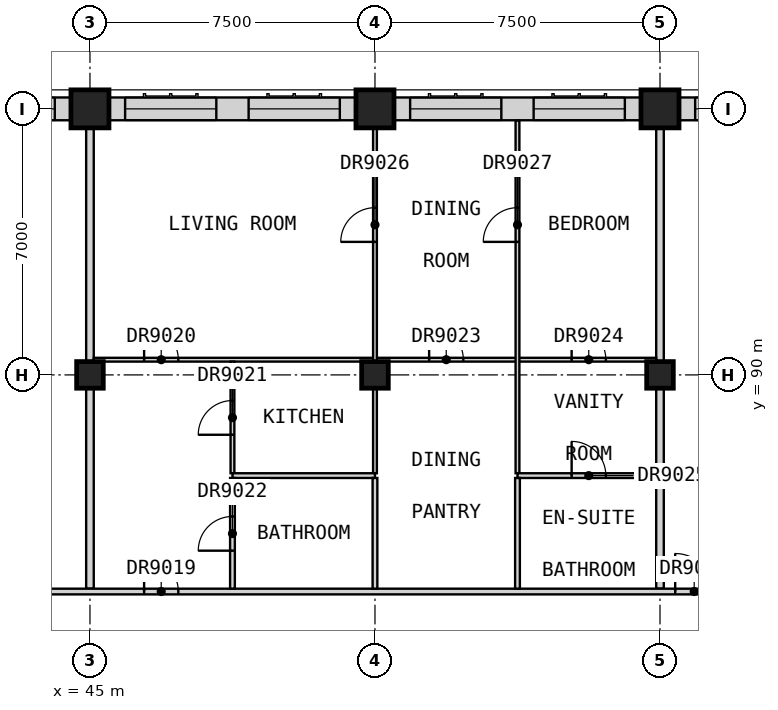
"""IFC4 building model, lengths in metres.
Left out: names, types, materials, properties, quantities, classifications, styles, units other than length and angle.
Written with IfcOpenShell. Run it as: python <this file> out.ifc"""

import sys

from ifc_helpers import new_model, si_unit, direction, frame, frame_2d, origin, origin_2d, place, context, subcontext, project, spatial, rectangle, extrude, element, fill, save


model = new_model("IFC4")
c1 = context("Model", 3, precision=1e-05, world=origin(), true_north=direction((0.0, 1.0)))
c2 = subcontext(c1, "Body", "Model", "MODEL_VIEW")
j1 = project(units=[si_unit("LENGTHUNIT", "METRE"), si_unit("PLANEANGLEUNIT", "RADIAN")], contexts=[c1])
p1 = place(None, origin())
s1 = spatial("IfcSite", under=j1, at=p1, CompositionType="ELEMENT")
p2 = place(p1, origin())
s2 = spatial("IfcBuilding", under=s1, at=p2, CompositionType="ELEMENT")
p3 = place(p2, frame((0.0, 0.0, 280.2)))
s3 = spatial("IfcBuildingStorey", under=s2, at=p3, CompositionType="ELEMENT", Elevation=280.2)
p4 = place(p3, frame((45.0, 90.0, 0.0), z_axis=(0.0, 0.0, 1.0), x_axis=(1.0, 0.0, 0.0)))
e1 = element("IfcColumn", 1, at=p4, inside=s3, PredefinedType="COLUMN", context=c2, shape_type="SweptSolid", body=[
    extrude(rectangle(XDim=0.7, YDim=0.7, at=origin_2d()), origin(), (0.0, 0.0, 1.0), 3.5),
])
p5 = place(p3, frame((45.0, 97.0, 0.0), z_axis=(0.0, 0.0, 1.0), x_axis=(1.0, 0.0, 0.0)))
e2 = element("IfcColumn", 2, at=p5, inside=s3, PredefinedType="COLUMN", context=c2, shape_type="SweptSolid", body=[
    extrude(rectangle(XDim=1.0, YDim=1.0, at=origin_2d()), origin(), (0.0, 0.0, 1.0), 3.5),
])
p6 = place(p3, frame((52.5, 90.0, 0.0), z_axis=(0.0, 0.0, 1.0), x_axis=(1.0, 0.0, 0.0)))
e3 = element("IfcColumn", 3, at=p6, inside=s3, PredefinedType="COLUMN", context=c2, shape_type="SweptSolid", body=[
    extrude(rectangle(XDim=0.7, YDim=0.7, at=origin_2d()), origin(), (0.0, 0.0, 1.0), 3.5),
])
p7 = place(p3, frame((52.5, 97.0, 0.0), z_axis=(0.0, 0.0, 1.0), x_axis=(1.0, 0.0, 0.0)))
e4 = element("IfcColumn", 4, at=p7, inside=s3, PredefinedType="COLUMN", context=c2, shape_type="SweptSolid", body=[
    extrude(rectangle(XDim=1.0, YDim=1.0, at=origin_2d()), origin(), (0.0, 0.0, 1.0), 3.5),
])
p8 = place(p3, frame((60.0, 90.0, 0.0), z_axis=(0.0, 0.0, 1.0), x_axis=(1.0, 0.0, 0.0)))
e5 = element("IfcColumn", 5, at=p8, inside=s3, PredefinedType="COLUMN", context=c2, shape_type="SweptSolid", body=[
    extrude(rectangle(XDim=0.7, YDim=0.7, at=origin_2d()), origin(), (0.0, 0.0, 1.0), 3.5),
])
p9 = place(p3, frame((60.0, 97.0, 0.0), z_axis=(0.0, 0.0, 1.0), x_axis=(1.0, 0.0, 0.0)))
e6 = element("IfcColumn", 6, at=p9, inside=s3, PredefinedType="COLUMN", context=c2, shape_type="SweptSolid", body=[
    extrude(rectangle(XDim=1.0, YDim=1.0, at=origin_2d()), origin(), (0.0, 0.0, 1.0), 3.5),
])
p10 = place(p3, frame((67.0, 97.0, 0.0), z_axis=(0.0, 0.0, 1.0), x_axis=(-1.0, 0.0, 0.0)))
e7 = element("IfcWall", 7, at=p10, inside=s3, PredefinedType="SOLIDWALL", context=c2, shape_type="SweptSolid", body=[
    extrude(rectangle(XDim=6.5, YDim=0.6, at=frame_2d((3.25, 0.0))), origin(), (0.0, 0.0, 1.0), 2.75),
])
p11 = place(p10, frame((3.675, 0.0, 0.8)))
e8 = element("IfcOpeningElement", 8, at=p11, cuts=e7, PredefinedType="OPENING", context=c2, shape_type="SweptSolid", body=[
    extrude(rectangle(XDim=2.4, YDim=1.8, at=frame_2d((1.2, 0.9))), frame((0.0, 0.31, 0.0), z_axis=(0.0, -1.0, 0.0), x_axis=(1.0, 0.0, 0.0)), (0.0, 0.0, 1.0), 0.62),
])
p12 = place(p10, frame((0.425, 0.0, 0.8)))
e9 = element("IfcOpeningElement", 9, at=p12, cuts=e7, PredefinedType="OPENING", context=c2, shape_type="SweptSolid", body=[
    extrude(rectangle(XDim=2.4, YDim=1.8, at=frame_2d((1.2, 0.9))), frame((0.0, 0.31, 0.0), z_axis=(0.0, -1.0, 0.0), x_axis=(1.0, 0.0, 0.0)), (0.0, 0.0, 1.0), 0.62),
])
p13 = place(p3, frame((59.5, 97.0, 0.0), z_axis=(0.0, 0.0, 1.0), x_axis=(-1.0, 0.0, 0.0)))
e10 = element("IfcWall", 10, at=p13, inside=s3, PredefinedType="SOLIDWALL", context=c2, shape_type="SweptSolid", body=[
    extrude(rectangle(XDim=6.5, YDim=0.6, at=frame_2d((3.25, 0.0))), origin(), (0.0, 0.0, 1.0), 2.75),
])
p14 = place(p13, frame((3.675, 0.0, 0.8)))
e11 = element("IfcOpeningElement", 11, at=p14, cuts=e10, PredefinedType="OPENING", context=c2, shape_type="SweptSolid", body=[
    extrude(rectangle(XDim=2.4, YDim=1.8, at=frame_2d((1.2, 0.9))), frame((0.0, 0.31, 0.0), z_axis=(0.0, -1.0, 0.0), x_axis=(1.0, 0.0, 0.0)), (0.0, 0.0, 1.0), 0.62),
])
p15 = place(p13, frame((0.425, 0.0, 0.8)))
e12 = element("IfcOpeningElement", 12, at=p15, cuts=e10, PredefinedType="OPENING", context=c2, shape_type="SweptSolid", body=[
    extrude(rectangle(XDim=2.4, YDim=1.8, at=frame_2d((1.2, 0.9))), frame((0.0, 0.31, 0.0), z_axis=(0.0, -1.0, 0.0), x_axis=(1.0, 0.0, 0.0)), (0.0, 0.0, 1.0), 0.62),
])
p16 = place(p3, frame((52.0, 97.0, 0.0), z_axis=(0.0, 0.0, 1.0), x_axis=(-1.0, 0.0, 0.0)))
e13 = element("IfcWall", 13, at=p16, inside=s3, PredefinedType="SOLIDWALL", context=c2, shape_type="SweptSolid", body=[
    extrude(rectangle(XDim=6.5, YDim=0.6, at=frame_2d((3.25, 0.0))), origin(), (0.0, 0.0, 1.0), 2.75),
])
p17 = place(p16, frame((3.675, 0.0, 0.8)))
e14 = element("IfcOpeningElement", 14, at=p17, cuts=e13, PredefinedType="OPENING", context=c2, shape_type="SweptSolid", body=[
    extrude(rectangle(XDim=2.4, YDim=1.8, at=frame_2d((1.2, 0.9))), frame((0.0, 0.31, 0.0), z_axis=(0.0, -1.0, 0.0), x_axis=(1.0, 0.0, 0.0)), (0.0, 0.0, 1.0), 0.62),
])
p18 = place(p16, frame((0.425, 0.0, 0.8)))
e15 = element("IfcOpeningElement", 15, at=p18, cuts=e13, PredefinedType="OPENING", context=c2, shape_type="SweptSolid", body=[
    extrude(rectangle(XDim=2.4, YDim=1.8, at=frame_2d((1.2, 0.9))), frame((0.0, 0.31, 0.0), z_axis=(0.0, -1.0, 0.0), x_axis=(1.0, 0.0, 0.0)), (0.0, 0.0, 1.0), 0.62),
])
p19 = place(p3, frame((44.5, 97.0, 0.0), z_axis=(0.0, 0.0, 1.0), x_axis=(-1.0, 0.0, 0.0)))
e16 = element("IfcWall", 16, at=p19, inside=s3, PredefinedType="SOLIDWALL", context=c2, shape_type="SweptSolid", body=[
    extrude(rectangle(XDim=6.5, YDim=0.6, at=frame_2d((3.25, 0.0))), origin(), (0.0, 0.0, 1.0), 2.75),
])
p20 = place(p19, frame((3.675, 0.0, 0.8)))
e17 = element("IfcOpeningElement", 17, at=p20, cuts=e16, PredefinedType="OPENING", context=c2, shape_type="SweptSolid", body=[
    extrude(rectangle(XDim=2.4, YDim=1.8, at=frame_2d((1.2, 0.9))), frame((0.0, 0.31, 0.0), z_axis=(0.0, -1.0, 0.0), x_axis=(1.0, 0.0, 0.0)), (0.0, 0.0, 1.0), 0.62),
])
p21 = place(p19, frame((0.425, 0.0, 0.8)))
e18 = element("IfcOpeningElement", 18, at=p21, cuts=e16, PredefinedType="OPENING", context=c2, shape_type="SweptSolid", body=[
    extrude(rectangle(XDim=2.4, YDim=1.8, at=frame_2d((1.2, 0.9))), frame((0.0, 0.31, 0.0), z_axis=(0.0, -1.0, 0.0), x_axis=(1.0, 0.0, 0.0)), (0.0, 0.0, 1.0), 0.62),
])
for number, where, z_axis, x_axis in (
    (19, (45.0, 84.375, 0.0), (0.0, 0.0, 1.0), (0.0, 1.0, 0.0)),
    (20, (60.0, 84.375, 0.0), (0.0, 0.0, 1.0), (0.0, 1.0, 0.0)),
):
    element("IfcWall", number, at=place(p3, frame(where, z_axis=z_axis, x_axis=x_axis)), inside=s3, PredefinedType="PARTITIONING", context=c2, shape_type="SweptSolid", body=[
        extrude(rectangle(XDim=13.125, YDim=0.2, at=frame_2d((6.562, 0.0))), origin(), (0.0, 0.0, 1.0), 3.25),
    ])
p22 = place(p3, frame((33.75, 84.3, 0.0), z_axis=(0.0, 0.0, 1.0), x_axis=(1.0, 0.0, 0.0)))
e21 = element("IfcWall", 21, at=p22, inside=s3, PredefinedType="PARTITIONING", context=c2, shape_type="SweptSolid", body=[
    extrude(rectangle(XDim=28.05, YDim=0.15, at=frame_2d((14.025, 0.0))), origin(), (0.0, 0.0, 1.0), 3.25),
])
p23 = place(p22, frame((5.125, 0.0, 0.0)))
e22 = element("IfcOpeningElement", 22, at=p23, cuts=e21, PredefinedType="OPENING", context=c2, shape_type="SweptSolid", body=[
    extrude(rectangle(XDim=1.0, YDim=2.1, at=frame_2d((0.5, 1.05))), frame((0.0, 0.085, 0.0), z_axis=(0.0, -1.0, 0.0), x_axis=(1.0, 0.0, 0.0)), (0.0, 0.0, 1.0), 0.17),
])
p24 = place(p22, frame((12.675, 0.0, 0.0)))
e23 = element("IfcOpeningElement", 23, at=p24, cuts=e21, PredefinedType="OPENING", context=c2, shape_type="SweptSolid", body=[
    extrude(rectangle(XDim=0.9, YDim=2.1, at=frame_2d((0.45, 1.05))), frame((0.0, 0.085, 0.0), z_axis=(0.0, -1.0, 0.0), x_axis=(1.0, 0.0, 0.0)), (0.0, 0.0, 1.0), 0.17),
])
p25 = place(p22, frame((26.65, 0.0, 0.0)))
e24 = element("IfcOpeningElement", 24, at=p25, cuts=e21, PredefinedType="OPENING", context=c2, shape_type="SweptSolid", body=[
    extrude(rectangle(XDim=1.0, YDim=2.1, at=frame_2d((0.5, 1.05))), frame((0.0, 0.085, 0.0), z_axis=(0.0, -1.0, 0.0), x_axis=(1.0, 0.0, 0.0)), (0.0, 0.0, 1.0), 0.17),
])
p26 = place(p3, frame((45.1, 90.4, 0.0), z_axis=(0.0, 0.0, 1.0), x_axis=(1.0, 0.0, 0.0)))
e25 = element("IfcWall", 25, at=p26, inside=s3, PredefinedType="PARTITIONING", context=c2, shape_type="SweptSolid", body=[
    extrude(rectangle(XDim=14.8, YDim=0.1, at=frame_2d((7.4, 0.0))), origin(), (0.0, 0.0, 1.0), 3.25),
])
p27 = place(p26, frame((1.325, 0.0, 0.0)))
e26 = element("IfcOpeningElement", 26, at=p27, cuts=e25, PredefinedType="OPENING", context=c2, shape_type="SweptSolid", body=[
    extrude(rectangle(XDim=0.9, YDim=2.1, at=frame_2d((0.45, 1.05))), frame((0.0, 0.06, 0.0), z_axis=(0.0, -1.0, 0.0), x_axis=(1.0, 0.0, 0.0)), (0.0, 0.0, 1.0), 0.12),
])
p28 = place(p26, frame((8.825, 0.0, 0.0)))
e27 = element("IfcOpeningElement", 27, at=p28, cuts=e25, PredefinedType="OPENING", context=c2, shape_type="SweptSolid", body=[
    extrude(rectangle(XDim=0.9, YDim=2.1, at=frame_2d((0.45, 1.05))), frame((0.0, 0.06, 0.0), z_axis=(0.0, -1.0, 0.0), x_axis=(1.0, 0.0, 0.0)), (0.0, 0.0, 1.0), 0.12),
])
p29 = place(p26, frame((12.575, 0.0, 0.0)))
e28 = element("IfcOpeningElement", 28, at=p29, cuts=e25, PredefinedType="OPENING", context=c2, shape_type="SweptSolid", body=[
    extrude(rectangle(XDim=0.9, YDim=2.1, at=frame_2d((0.45, 1.05))), frame((0.0, 0.06, 0.0), z_axis=(0.0, -1.0, 0.0), x_axis=(1.0, 0.0, 0.0)), (0.0, 0.0, 1.0), 0.12),
])
p30 = place(p3, frame((48.75, 87.413, 0.0), z_axis=(0.0, 0.0, 1.0), x_axis=(0.0, 1.0, 0.0)))
e29 = element("IfcWall", 29, at=p30, inside=s3, PredefinedType="PARTITIONING", context=c2, shape_type="SweptSolid", body=[
    extrude(rectangle(XDim=2.938, YDim=0.1, at=frame_2d((1.469, 0.0))), origin(), (0.0, 0.0, 1.0), 3.25),
])
p31 = place(p30, frame((1.012, 0.0, 0.0)))
e30 = element("IfcOpeningElement", 30, at=p31, cuts=e29, PredefinedType="OPENING", context=c2, shape_type="SweptSolid", body=[
    extrude(rectangle(XDim=0.9, YDim=2.1, at=frame_2d((0.45, 1.05))), frame((0.0, 0.06, 0.0), z_axis=(0.0, -1.0, 0.0), x_axis=(1.0, 0.0, 0.0)), (0.0, 0.0, 1.0), 0.12),
])
p32 = place(p3, frame((52.5, 87.413, 0.0), z_axis=(0.0, 0.0, 1.0), x_axis=(0.0, 1.0, 0.0)))
e31 = element("IfcWall", 31, at=p32, inside=s3, PredefinedType="PARTITIONING", context=c2, shape_type="SweptSolid", body=[
    extrude(rectangle(XDim=10.087, YDim=0.1, at=frame_2d((5.044, 0.0))), origin(), (0.0, 0.0, 1.0), 3.25),
])
p33 = place(p32, frame((6.087, 0.0, 0.0)))
e32 = element("IfcOpeningElement", 32, at=p33, cuts=e31, PredefinedType="OPENING", context=c2, shape_type="SweptSolid", body=[
    extrude(rectangle(XDim=0.9, YDim=2.1, at=frame_2d((0.45, 1.05))), frame((0.0, 0.06, 0.0), z_axis=(0.0, -1.0, 0.0), x_axis=(1.0, 0.0, 0.0)), (0.0, 0.0, 1.0), 0.12),
])
p34 = place(p3, frame((56.25, 87.413, 0.0), z_axis=(0.0, 0.0, 1.0), x_axis=(0.0, 1.0, 0.0)))
e33 = element("IfcWall", 33, at=p34, inside=s3, PredefinedType="PARTITIONING", context=c2, shape_type="SweptSolid", body=[
    extrude(rectangle(XDim=9.277, YDim=0.1, at=frame_2d((4.639, 0.0))), origin(), (0.0, 0.0, 1.0), 3.25),
])
p35 = place(p34, frame((6.087, 0.0, 0.0)))
e34 = element("IfcOpeningElement", 34, at=p35, cuts=e33, PredefinedType="OPENING", context=c2, shape_type="SweptSolid", body=[
    extrude(rectangle(XDim=0.9, YDim=2.1, at=frame_2d((0.45, 1.05))), frame((0.0, 0.06, 0.0), z_axis=(0.0, -1.0, 0.0), x_axis=(1.0, 0.0, 0.0)), (0.0, 0.0, 1.0), 0.12),
])
p36 = place(p3, frame((48.75, 87.35, 0.0), z_axis=(0.0, 0.0, 1.0), x_axis=(1.0, 0.0, 0.0)))
e35 = element("IfcWall", 35, at=p36, inside=s3, PredefinedType="PARTITIONING", context=c2, shape_type="SweptSolid", body=[
    extrude(rectangle(XDim=3.75, YDim=0.125, at=frame_2d((1.875, 0.0))), origin(), (0.0, 0.0, 1.0), 3.25),
])
p37 = place(p3, frame((56.25, 87.35, 0.0), z_axis=(0.0, 0.0, 1.0), x_axis=(1.0, 0.0, 0.0)))
e36 = element("IfcWall", 36, at=p37, inside=s3, PredefinedType="PARTITIONING", context=c2, shape_type="SweptSolid", body=[
    extrude(rectangle(XDim=3.65, YDim=0.125, at=frame_2d((1.825, 0.0))), origin(), (0.0, 0.0, 1.0), 3.25),
])
p38 = place(p37, frame((1.425, 0.0, 0.0)))
e37 = element("IfcOpeningElement", 37, at=p38, cuts=e36, PredefinedType="OPENING", context=c2, shape_type="SweptSolid", body=[
    extrude(rectangle(XDim=0.9, YDim=2.1, at=frame_2d((0.45, 1.05))), frame((0.0, 0.073, 0.0), z_axis=(0.0, -1.0, 0.0), x_axis=(1.0, 0.0, 0.0)), (0.0, 0.0, 1.0), 0.145),
])
p39 = place(p3, frame((48.75, 84.375, 0.0), z_axis=(0.0, 0.0, 1.0), x_axis=(0.0, 1.0, 0.0)))
e38 = element("IfcWall", 38, at=p39, inside=s3, PredefinedType="PARTITIONING", context=c2, shape_type="SweptSolid", body=[
    extrude(rectangle(XDim=2.913, YDim=0.125, at=frame_2d((1.456, 0.0))), origin(), (0.0, 0.0, 1.0), 3.25),
])
p40 = place(p39, frame((1.0, 0.0, 0.0)))
e39 = element("IfcOpeningElement", 39, at=p40, cuts=e38, PredefinedType="OPENING", context=c2, shape_type="SweptSolid", body=[
    extrude(rectangle(XDim=0.9, YDim=2.1, at=frame_2d((0.45, 1.05))), frame((0.0, 0.073, 0.0), z_axis=(0.0, -1.0, 0.0), x_axis=(1.0, 0.0, 0.0)), (0.0, 0.0, 1.0), 0.145),
])
for number, where, z_axis, x_axis in (
    (40, (52.5, 84.375, 0.0), (0.0, 0.0, 1.0), (0.0, 1.0, 0.0)),
    (41, (56.25, 84.375, 0.0), (0.0, 0.0, 1.0), (0.0, 1.0, 0.0)),
):
    element("IfcWall", number, at=place(p3, frame(where, z_axis=z_axis, x_axis=x_axis)), inside=s3, PredefinedType="PARTITIONING", context=c2, shape_type="SweptSolid", body=[
        extrude(rectangle(XDim=2.913, YDim=0.125, at=frame_2d((1.456, 0.0))), origin(), (0.0, 0.0, 1.0), 3.25),
    ])
p41 = place(p11, origin())
e42 = element("IfcWindow", 42, at=p41, inside=s3, PartitioningType="SINGLE_PANEL", PredefinedType="WINDOW", context=c2, shape_type="SweptSolid", body=[
    extrude(rectangle(XDim=2.4, YDim=1.8, at=frame_2d((1.2, 0.9))), frame((0.0, -0.07, 0.0), z_axis=(0.0, -1.0, 0.0), x_axis=(1.0, 0.0, 0.0)), (0.0, 0.0, 1.0), 0.06),
])
fill(e8, e42)
p42 = place(p14, origin())
e43 = element("IfcWindow", 43, at=p42, inside=s3, PartitioningType="SINGLE_PANEL", PredefinedType="WINDOW", context=c2, shape_type="SweptSolid", body=[
    extrude(rectangle(XDim=2.4, YDim=1.8, at=frame_2d((1.2, 0.9))), frame((0.0, -0.07, 0.0), z_axis=(0.0, -1.0, 0.0), x_axis=(1.0, 0.0, 0.0)), (0.0, 0.0, 1.0), 0.06),
])
fill(e11, e43)
p43 = place(p15, origin())
e44 = element("IfcWindow", 44, at=p43, inside=s3, PartitioningType="SINGLE_PANEL", PredefinedType="WINDOW", context=c2, shape_type="SweptSolid", body=[
    extrude(rectangle(XDim=2.4, YDim=1.8, at=frame_2d((1.2, 0.9))), frame((0.0, -0.07, 0.0), z_axis=(0.0, -1.0, 0.0), x_axis=(1.0, 0.0, 0.0)), (0.0, 0.0, 1.0), 0.06),
])
fill(e12, e44)
p44 = place(p17, origin())
e45 = element("IfcWindow", 45, at=p44, inside=s3, PartitioningType="SINGLE_PANEL", PredefinedType="WINDOW", context=c2, shape_type="SweptSolid", body=[
    extrude(rectangle(XDim=2.4, YDim=1.8, at=frame_2d((1.2, 0.9))), frame((0.0, -0.07, 0.0), z_axis=(0.0, -1.0, 0.0), x_axis=(1.0, 0.0, 0.0)), (0.0, 0.0, 1.0), 0.06),
])
fill(e14, e45)
p45 = place(p18, origin())
e46 = element("IfcWindow", 46, at=p45, inside=s3, PartitioningType="SINGLE_PANEL", PredefinedType="WINDOW", context=c2, shape_type="SweptSolid", body=[
    extrude(rectangle(XDim=2.4, YDim=1.8, at=frame_2d((1.2, 0.9))), frame((0.0, -0.07, 0.0), z_axis=(0.0, -1.0, 0.0), x_axis=(1.0, 0.0, 0.0)), (0.0, 0.0, 1.0), 0.06),
])
fill(e15, e46)
p46 = place(p21, origin())
e47 = element("IfcWindow", 47, at=p46, inside=s3, PartitioningType="SINGLE_PANEL", PredefinedType="WINDOW", context=c2, shape_type="SweptSolid", body=[
    extrude(rectangle(XDim=2.4, YDim=1.8, at=frame_2d((1.2, 0.9))), frame((0.0, -0.07, 0.0), z_axis=(0.0, -1.0, 0.0), x_axis=(1.0, 0.0, 0.0)), (0.0, 0.0, 1.0), 0.06),
])
fill(e18, e47)
p47 = place(p24, origin())
e48 = element("IfcDoor", 48, at=p47, inside=s3, OperationType="SINGLE_SWING_LEFT", PredefinedType="DOOR", context=c2, shape_type="SweptSolid", body=[
    extrude(rectangle(XDim=0.9, YDim=2.1, at=frame_2d((0.45, 1.05))), frame((0.0, 0.025, 0.0), z_axis=(0.0, -1.0, 0.0), x_axis=(1.0, 0.0, 0.0)), (0.0, 0.0, 1.0), 0.05),
])
fill(e23, e48)
p48 = place(p27, origin())
e49 = element("IfcDoor", 49, at=p48, inside=s3, OperationType="SINGLE_SWING_RIGHT", PredefinedType="DOOR", context=c2, shape_type="SweptSolid", body=[
    extrude(rectangle(XDim=0.9, YDim=2.1, at=frame_2d((0.45, 1.05))), frame((0.0, 0.025, 0.0), z_axis=(0.0, -1.0, 0.0), x_axis=(1.0, 0.0, 0.0)), (0.0, 0.0, 1.0), 0.05),
])
fill(e26, e49)
p49 = place(p31, origin())
e50 = element("IfcDoor", 50, at=p49, inside=s3, OperationType="SINGLE_SWING_RIGHT", PredefinedType="DOOR", context=c2, shape_type="SweptSolid", body=[
    extrude(rectangle(XDim=0.9, YDim=2.1, at=frame_2d((0.45, 1.05))), frame((0.0, 0.025, 0.0), z_axis=(0.0, -1.0, 0.0), x_axis=(1.0, 0.0, 0.0)), (0.0, 0.0, 1.0), 0.05),
])
fill(e30, e50)
p50 = place(p40, origin())
e51 = element("IfcDoor", 51, at=p50, inside=s3, OperationType="SINGLE_SWING_LEFT", PredefinedType="DOOR", context=c2, shape_type="SweptSolid", body=[
    extrude(rectangle(XDim=0.9, YDim=2.1, at=frame_2d((0.45, 1.05))), frame((0.0, 0.025, 0.0), z_axis=(0.0, -1.0, 0.0), x_axis=(1.0, 0.0, 0.0)), (0.0, 0.0, 1.0), 0.05),
])
fill(e39, e51)
p51 = place(p28, origin())
e52 = element("IfcDoor", 52, at=p51, inside=s3, OperationType="SINGLE_SWING_RIGHT", PredefinedType="DOOR", context=c2, shape_type="SweptSolid", body=[
    extrude(rectangle(XDim=0.9, YDim=2.1, at=frame_2d((0.45, 1.05))), frame((0.0, 0.025, 0.0), z_axis=(0.0, -1.0, 0.0), x_axis=(1.0, 0.0, 0.0)), (0.0, 0.0, 1.0), 0.05),
])
fill(e27, e52)
p52 = place(p29, origin())
e53 = element("IfcDoor", 53, at=p52, inside=s3, OperationType="SINGLE_SWING_RIGHT", PredefinedType="DOOR", context=c2, shape_type="SweptSolid", body=[
    extrude(rectangle(XDim=0.9, YDim=2.1, at=frame_2d((0.45, 1.05))), frame((0.0, 0.025, 0.0), z_axis=(0.0, -1.0, 0.0), x_axis=(1.0, 0.0, 0.0)), (0.0, 0.0, 1.0), 0.05),
])
fill(e28, e53)
p53 = place(p38, origin())
e54 = element("IfcDoor", 54, at=p53, inside=s3, OperationType="SINGLE_SWING_RIGHT", PredefinedType="DOOR", context=c2, shape_type="SweptSolid", body=[
    extrude(rectangle(XDim=0.9, YDim=2.1, at=frame_2d((0.45, 1.05))), frame((0.0, 0.025, 0.0), z_axis=(0.0, -1.0, 0.0), x_axis=(1.0, 0.0, 0.0)), (0.0, 0.0, 1.0), 0.05),
])
fill(e37, e54)
p54 = place(p33, origin())
e55 = element("IfcDoor", 55, at=p54, inside=s3, OperationType="SINGLE_SWING_RIGHT", PredefinedType="DOOR", context=c2, shape_type="SweptSolid", body=[
    extrude(rectangle(XDim=0.9, YDim=2.1, at=frame_2d((0.45, 1.05))), frame((0.0, 0.025, 0.0), z_axis=(0.0, -1.0, 0.0), x_axis=(1.0, 0.0, 0.0)), (0.0, 0.0, 1.0), 0.05),
])
fill(e32, e55)
p55 = place(p35, origin())
e56 = element("IfcDoor", 56, at=p55, inside=s3, OperationType="SINGLE_SWING_RIGHT", PredefinedType="DOOR", context=c2, shape_type="SweptSolid", body=[
    extrude(rectangle(XDim=0.9, YDim=2.1, at=frame_2d((0.45, 1.05))), frame((0.0, 0.025, 0.0), z_axis=(0.0, -1.0, 0.0), x_axis=(1.0, 0.0, 0.0)), (0.0, 0.0, 1.0), 0.05),
])
fill(e34, e56)
p56 = place(p25, origin())
e57 = element("IfcDoor", 57, at=p56, inside=s3, OperationType="SINGLE_SWING_LEFT", PredefinedType="DOOR", context=c2, shape_type="SweptSolid", body=[
    extrude(rectangle(XDim=1.0, YDim=2.1, at=frame_2d((0.5, 1.05))), frame((0.0, 0.025, 0.0), z_axis=(0.0, -1.0, 0.0), x_axis=(1.0, 0.0, 0.0)), (0.0, 0.0, 1.0), 0.05),
])
fill(e24, e57)
save(model, sys.argv[1])
